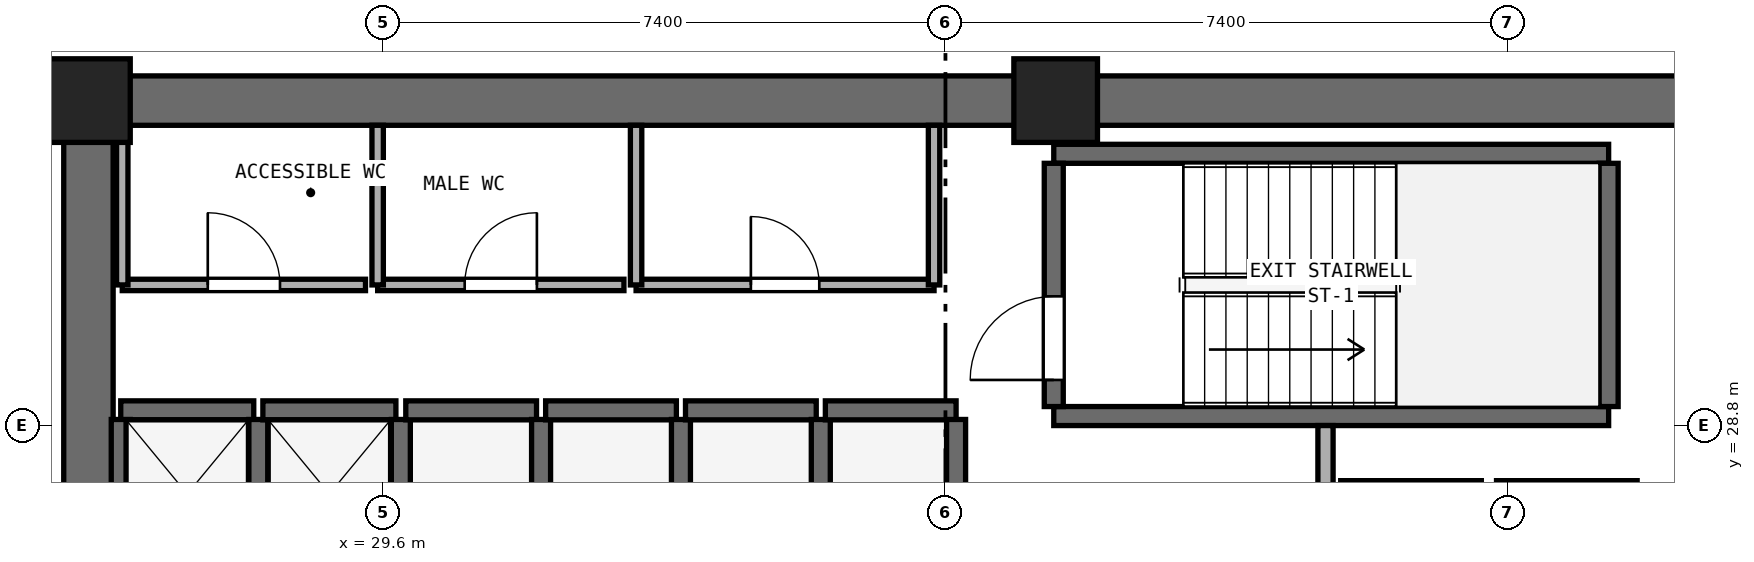
"""IFC4 building model, lengths in metres.
Left out: names, types, materials, properties, quantities, classifications, styles, units other than length and angle.
Written with IfcOpenShell. Run it as: python <this file> out.ifc"""

import sys

from ifc_helpers import new_model, si_unit, direction, frame, frame_2d, origin, origin_2d, place, context, subcontext, project, spatial, rectangle, extrude, element, fill, save


model = new_model("IFC4")
c1 = context("Model", 3, precision=1e-05, world=origin(), true_north=direction((0.0, 1.0)))
c2 = subcontext(c1, "Body", "Model", "MODEL_VIEW")
j1 = project(units=[si_unit("LENGTHUNIT", "METRE"), si_unit("PLANEANGLEUNIT", "RADIAN")], contexts=[c1])
p1 = place(None, origin())
s1 = spatial("IfcSite", under=j1, at=p1, CompositionType="ELEMENT")
p2 = place(p1, origin())
s2 = spatial("IfcBuilding", under=s1, at=p2, CompositionType="ELEMENT")
p3 = place(p2, frame((0.0, 0.0, 66.8)))
s3 = spatial("IfcBuildingStorey", under=s2, at=p3, CompositionType="ELEMENT", Elevation=66.8)
p4 = place(p3, frame((25.4, 33.075, 0.0), z_axis=(0.0, 0.0, 1.0), x_axis=(1.0, 0.0, 0.0)))
e1 = element("IfcWall", 1, at=p4, inside=s3, PredefinedType="SHEAR", context=c2, shape_type="SweptSolid", body=[
    extrude(rectangle(XDim=23.2, YDim=0.65, at=frame_2d((11.6, 0.0))), origin(), (0.0, 0.0, 1.0), 3.525),
])
p5 = place(p3, frame((25.725, 17.65, 0.0), z_axis=(0.0, 0.0, 1.0), x_axis=(0.0, 1.0, 0.0)))
e2 = element("IfcWall", 2, at=p5, inside=s3, PredefinedType="SHEAR", context=c2, shape_type="SweptSolid", body=[
    extrude(rectangle(XDim=15.1, YDim=0.65, at=frame_2d((7.55, 0.0))), origin(), (0.0, 0.0, 1.0), 3.525),
])
p6 = place(p5, frame((6.8, 0.0, 0.0)))
e3 = element("IfcOpeningElement", 3, at=p6, cuts=e2, PredefinedType="OPENING", context=c2, shape_type="SweptSolid", body=[
    extrude(rectangle(XDim=1.5, YDim=2.15, at=frame_2d((0.75, 1.075))), frame((0.0, 0.335, 0.0), z_axis=(0.0, -1.0, 0.0), x_axis=(1.0, 0.0, 0.0)), (0.0, 0.0, 1.0), 0.67),
])
for number, where, z_axis, x_axis in (
    (4, (38.45, 33.075, 0.0), (0.0, 0.0, 1.0), (1.0, 0.0, 0.0)),
    (5, (25.725, 33.075, 0.0), (0.0, 0.0, 1.0), (1.0, 0.0, 0.0)),
):
    element("IfcColumn", number, at=place(p3, frame(where, z_axis=z_axis, x_axis=x_axis)), inside=s3, PredefinedType="PILASTER", context=c2, shape_type="SweptSolid", body=[
        extrude(rectangle(XDim=1.1, YDim=1.1, at=origin_2d()), origin(), (0.0, 0.0, 1.0), 3.8),
    ])
for number, where, z_axis, x_axis in (
    (6, (38.425, 28.925, 0.0), (0.0, 0.0, 1.0), (1.0, 0.0, 0.0)),
    (7, (38.425, 32.375, 0.0), (0.0, 0.0, 1.0), (1.0, 0.0, 0.0)),
):
    element("IfcWall", number, at=place(p3, frame(where, z_axis=z_axis, x_axis=x_axis)), inside=s3, PredefinedType="SHEAR", context=c2, shape_type="SweptSolid", body=[
        extrude(rectangle(XDim=7.3, YDim=0.25, at=frame_2d((3.65, 0.0))), origin(), (0.0, 0.0, 1.0), 3.525),
    ])
p7 = place(p3, frame((38.425, 29.05, 0.0), z_axis=(0.0, 0.0, 1.0), x_axis=(0.0, 1.0, 0.0)))
e8 = element("IfcWall", 8, at=p7, inside=s3, PredefinedType="SHEAR", context=c2, shape_type="SweptSolid", body=[
    extrude(rectangle(XDim=3.2, YDim=0.25, at=frame_2d((1.6, 0.0))), origin(), (0.0, 0.0, 1.0), 3.525),
])
p8 = place(p7, frame((0.35, 0.0, 0.0)))
e9 = element("IfcOpeningElement", 9, at=p8, cuts=e8, PredefinedType="OPENING", context=c2, shape_type="SweptSolid", body=[
    extrude(rectangle(XDim=1.1, YDim=2.15, at=frame_2d((0.55, 1.075))), frame((0.0, 0.135, 0.0), z_axis=(0.0, -1.0, 0.0), x_axis=(1.0, 0.0, 0.0)), (0.0, 0.0, 1.0), 0.27),
])
p9 = place(p3, frame((45.725, 29.05, 0.0), z_axis=(0.0, 0.0, 1.0), x_axis=(0.0, 1.0, 0.0)))
e10 = element("IfcWall", 10, at=p9, inside=s3, PredefinedType="SHEAR", context=c2, shape_type="SweptSolid", body=[
    extrude(rectangle(XDim=3.2, YDim=0.25, at=frame_2d((1.6, 0.0))), origin(), (0.0, 0.0, 1.0), 3.525),
])
p10 = place(p3, frame((26.15, 29.0, 0.0), z_axis=(0.0, 0.0, 1.0), x_axis=(1.0, 0.0, 0.0)))
e11 = element("IfcWall", 11, at=p10, inside=s3, PredefinedType="SHEAR", context=c2, shape_type="SweptSolid", body=[
    extrude(rectangle(XDim=1.75, YDim=0.25, at=frame_2d((0.875, 0.0))), origin(), (0.0, 0.0, 1.0), 3.525),
])
for number, where, z_axis, x_axis in (
    (12, (26.15, 26.92, 0.0), (0.0, 0.0, 1.0), (0.0, 1.0, 0.0)),
    (13, (27.96, 26.92, 0.0), (0.0, 0.0, 1.0), (0.0, 1.0, 0.0)),
):
    element("IfcWall", number, at=place(p3, frame(where, z_axis=z_axis, x_axis=x_axis)), inside=s3, PredefinedType="SHEAR", context=c2, shape_type="SweptSolid", body=[
        extrude(rectangle(XDim=1.96, YDim=0.25, at=frame_2d((0.98, 0.0))), origin(), (0.0, 0.0, 1.0), 3.525),
    ])
p11 = place(p3, frame((28.02, 29.0, 0.0), z_axis=(0.0, 0.0, 1.0), x_axis=(1.0, 0.0, 0.0)))
e14 = element("IfcWall", 14, at=p11, inside=s3, PredefinedType="SHEAR", context=c2, shape_type="SweptSolid", body=[
    extrude(rectangle(XDim=1.75, YDim=0.25, at=frame_2d((0.875, 0.0))), origin(), (0.0, 0.0, 1.0), 3.525),
])
p12 = place(p3, frame((29.835, 26.92, 0.0), z_axis=(0.0, 0.0, 1.0), x_axis=(0.0, 1.0, 0.0)))
e15 = element("IfcWall", 15, at=p12, inside=s3, PredefinedType="SHEAR", context=c2, shape_type="SweptSolid", body=[
    extrude(rectangle(XDim=1.96, YDim=0.25, at=frame_2d((0.98, 0.0))), origin(), (0.0, 0.0, 1.0), 3.525),
])
p13 = place(p3, frame((29.9, 29.0, 0.0), z_axis=(0.0, 0.0, 1.0), x_axis=(1.0, 0.0, 0.0)))
e16 = element("IfcWall", 16, at=p13, inside=s3, PredefinedType="SHEAR", context=c2, shape_type="SweptSolid", body=[
    extrude(rectangle(XDim=1.72, YDim=0.25, at=frame_2d((0.86, 0.0))), origin(), (0.0, 0.0, 1.0), 3.525),
])
p14 = place(p3, frame((31.68, 26.92, 0.0), z_axis=(0.0, 0.0, 1.0), x_axis=(0.0, 1.0, 0.0)))
e17 = element("IfcWall", 17, at=p14, inside=s3, PredefinedType="SHEAR", context=c2, shape_type="SweptSolid", body=[
    extrude(rectangle(XDim=1.96, YDim=0.25, at=frame_2d((0.98, 0.0))), origin(), (0.0, 0.0, 1.0), 3.525),
])
p15 = place(p3, frame((31.74, 29.0, 0.0), z_axis=(0.0, 0.0, 1.0), x_axis=(1.0, 0.0, 0.0)))
e18 = element("IfcWall", 18, at=p15, inside=s3, PredefinedType="SHEAR", context=c2, shape_type="SweptSolid", body=[
    extrude(rectangle(XDim=1.72, YDim=0.25, at=frame_2d((0.86, 0.0))), origin(), (0.0, 0.0, 1.0), 3.525),
])
p16 = place(p3, frame((33.52, 26.92, 0.0), z_axis=(0.0, 0.0, 1.0), x_axis=(0.0, 1.0, 0.0)))
e19 = element("IfcWall", 19, at=p16, inside=s3, PredefinedType="SHEAR", context=c2, shape_type="SweptSolid", body=[
    extrude(rectangle(XDim=1.96, YDim=0.25, at=frame_2d((0.98, 0.0))), origin(), (0.0, 0.0, 1.0), 3.525),
])
p17 = place(p3, frame((33.58, 29.0, 0.0), z_axis=(0.0, 0.0, 1.0), x_axis=(1.0, 0.0, 0.0)))
e20 = element("IfcWall", 20, at=p17, inside=s3, PredefinedType="SHEAR", context=c2, shape_type="SweptSolid", body=[
    extrude(rectangle(XDim=1.72, YDim=0.25, at=frame_2d((0.86, 0.0))), origin(), (0.0, 0.0, 1.0), 3.525),
])
p18 = place(p3, frame((35.36, 26.92, 0.0), z_axis=(0.0, 0.0, 1.0), x_axis=(0.0, 1.0, 0.0)))
e21 = element("IfcWall", 21, at=p18, inside=s3, PredefinedType="SHEAR", context=c2, shape_type="SweptSolid", body=[
    extrude(rectangle(XDim=1.96, YDim=0.25, at=frame_2d((0.98, 0.0))), origin(), (0.0, 0.0, 1.0), 3.525),
])
p19 = place(p3, frame((35.42, 29.0, 0.0), z_axis=(0.0, 0.0, 1.0), x_axis=(1.0, 0.0, 0.0)))
e22 = element("IfcWall", 22, at=p19, inside=s3, PredefinedType="SHEAR", context=c2, shape_type="SweptSolid", body=[
    extrude(rectangle(XDim=1.72, YDim=0.25, at=frame_2d((0.86, 0.0))), origin(), (0.0, 0.0, 1.0), 3.525),
])
p20 = place(p3, frame((37.14, 26.92, 0.0), z_axis=(0.0, 0.0, 1.0), x_axis=(0.0, 1.0, 0.0)))
e23 = element("IfcWall", 23, at=p20, inside=s3, PredefinedType="SHEAR", context=c2, shape_type="SweptSolid", body=[
    extrude(rectangle(XDim=1.96, YDim=0.25, at=frame_2d((0.98, 0.0))), origin(), (0.0, 0.0, 1.0), 3.525),
])
for number, where, z_axis, x_axis in (
    (24, (42.2, 27.95, 0.0), (0.0, 0.0, 1.0), (1.0, 0.0, 0.0)),
    (25, (44.25, 27.95, 0.0), (0.0, 0.0, 1.0), (1.0, 0.0, 0.0)),
):
    element("IfcWall", number, at=place(p3, frame(where, z_axis=z_axis, x_axis=x_axis)), inside=s3, PredefinedType="SHEAR", context=c2, shape_type="SweptSolid", body=[
        extrude(rectangle(XDim=1.85, YDim=0.25, at=frame_2d((0.925, 0.0))), origin(), (0.0, 0.0, 1.0), 3.525),
    ])
p21 = place(p3, frame((42.0, 22.75, 0.0), z_axis=(0.0, 0.0, 1.0), x_axis=(0.0, 1.0, 0.0)))
e26 = element("IfcWall", 26, at=p21, inside=s3, PredefinedType="SOLIDWALL", context=c2, shape_type="SweptSolid", body=[
    extrude(rectangle(XDim=6.05, YDim=0.2, at=frame_2d((3.025, 0.0))), origin(), (0.0, 0.0, 1.0), 3.525),
])
p22 = place(p21, frame((0.65, 0.0, 0.0)))
e27 = element("IfcOpeningElement", 27, at=p22, cuts=e26, PredefinedType="OPENING", context=c2, shape_type="SweptSolid", body=[
    extrude(rectangle(XDim=1.2, YDim=2.15, at=frame_2d((0.6, 1.075))), frame((0.0, 0.11, 0.0), z_axis=(0.0, -1.0, 0.0), x_axis=(1.0, 0.0, 0.0)), (0.0, 0.0, 1.0), 0.22),
])
p23 = place(p3, frame((26.17, 30.65, 0.0), z_axis=(0.0, 0.0, 1.0), x_axis=(1.0, 0.0, 0.0)))
e28 = element("IfcWall", 28, at=p23, inside=s3, PredefinedType="PARTITIONING", context=c2, shape_type="SweptSolid", body=[
    extrude(rectangle(XDim=3.2, YDim=0.15, at=frame_2d((1.6, 0.0))), origin(), (0.0, 0.0, 1.0), 3.525),
])
p24 = place(p23, frame((1.125, 0.0, 0.0)))
e29 = element("IfcOpeningElement", 29, at=p24, cuts=e28, PredefinedType="OPENING", context=c2, shape_type="SweptSolid", body=[
    extrude(rectangle(XDim=0.95, YDim=2.1, at=frame_2d((0.475, 1.05))), frame((0.0, 0.085, 0.0), z_axis=(0.0, -1.0, 0.0), x_axis=(1.0, 0.0, 0.0)), (0.0, 0.0, 1.0), 0.17),
])
p25 = place(p3, frame((26.17, 30.65, 0.0), z_axis=(0.0, 0.0, 1.0), x_axis=(0.0, 1.0, 0.0)))
e30 = element("IfcWall", 30, at=p25, inside=s3, PredefinedType="PARTITIONING", context=c2, shape_type="SweptSolid", body=[
    extrude(rectangle(XDim=2.1, YDim=0.15, at=frame_2d((1.05, 0.0))), origin(), (0.0, 0.0, 1.0), 3.525),
])
p26 = place(p3, frame((29.53, 30.65, 0.0), z_axis=(0.0, 0.0, 1.0), x_axis=(1.0, 0.0, 0.0)))
e31 = element("IfcWall", 31, at=p26, inside=s3, PredefinedType="PARTITIONING", context=c2, shape_type="SweptSolid", body=[
    extrude(rectangle(XDim=3.24, YDim=0.15, at=frame_2d((1.62, 0.0))), origin(), (0.0, 0.0, 1.0), 3.525),
])
p27 = place(p26, frame((1.145, 0.0, 0.0)))
e32 = element("IfcOpeningElement", 32, at=p27, cuts=e31, PredefinedType="OPENING", context=c2, shape_type="SweptSolid", body=[
    extrude(rectangle(XDim=0.95, YDim=2.1, at=frame_2d((0.475, 1.05))), frame((0.0, 0.085, 0.0), z_axis=(0.0, -1.0, 0.0), x_axis=(1.0, 0.0, 0.0)), (0.0, 0.0, 1.0), 0.17),
])
p28 = place(p3, frame((29.53, 30.65, 0.0), z_axis=(0.0, 0.0, 1.0), x_axis=(0.0, 1.0, 0.0)))
e33 = element("IfcWall", 33, at=p28, inside=s3, PredefinedType="PARTITIONING", context=c2, shape_type="SweptSolid", body=[
    extrude(rectangle(XDim=2.1, YDim=0.15, at=frame_2d((1.05, 0.0))), origin(), (0.0, 0.0, 1.0), 3.525),
])
p29 = place(p3, frame((32.93, 30.65, 0.0), z_axis=(0.0, 0.0, 1.0), x_axis=(1.0, 0.0, 0.0)))
e34 = element("IfcWall", 34, at=p29, inside=s3, PredefinedType="PARTITIONING", context=c2, shape_type="SweptSolid", body=[
    extrude(rectangle(XDim=3.92, YDim=0.15, at=frame_2d((1.96, 0.0))), origin(), (0.0, 0.0, 1.0), 3.525),
])
p30 = place(p29, frame((1.51, 0.0, 0.0)))
e35 = element("IfcOpeningElement", 35, at=p30, cuts=e34, PredefinedType="OPENING", context=c2, shape_type="SweptSolid", body=[
    extrude(rectangle(XDim=0.9, YDim=2.1, at=frame_2d((0.45, 1.05))), frame((0.0, 0.085, 0.0), z_axis=(0.0, -1.0, 0.0), x_axis=(1.0, 0.0, 0.0)), (0.0, 0.0, 1.0), 0.17),
])
for number, where, z_axis, x_axis in (
    (36, (32.93, 30.65, 0.0), (0.0, 0.0, 1.0), (0.0, 1.0, 0.0)),
    (37, (36.85, 30.65, 0.0), (0.0, 0.0, 1.0), (0.0, 1.0, 0.0)),
):
    element("IfcWall", number, at=place(p3, frame(where, z_axis=z_axis, x_axis=x_axis)), inside=s3, PredefinedType="PARTITIONING", context=c2, shape_type="SweptSolid", body=[
        extrude(rectangle(XDim=2.1, YDim=0.15, at=frame_2d((1.05, 0.0))), origin(), (0.0, 0.0, 1.0), 3.525),
    ])
p31 = place(p8, origin())
e38 = element("IfcDoor", 38, at=p31, inside=s3, OperationType="SINGLE_SWING_LEFT", PredefinedType="DOOR", context=c2, shape_type="SweptSolid", body=[
    extrude(rectangle(XDim=1.1, YDim=2.15, at=frame_2d((0.55, 1.075))), frame((0.0, 0.025, 0.0), z_axis=(0.0, -1.0, 0.0), x_axis=(1.0, 0.0, 0.0)), (0.0, 0.0, 1.0), 0.05),
])
fill(e9, e38)
p32 = place(p24, origin())
e39 = element("IfcDoor", 39, at=p32, inside=s3, OperationType="SINGLE_SWING_LEFT", PredefinedType="DOOR", context=c2, shape_type="SweptSolid", body=[
    extrude(rectangle(XDim=0.95, YDim=2.1, at=frame_2d((0.475, 1.05))), frame((0.0, 0.025, 0.0), z_axis=(0.0, -1.0, 0.0), x_axis=(1.0, 0.0, 0.0)), (0.0, 0.0, 1.0), 0.05),
])
fill(e29, e39)
p33 = place(p27, origin())
e40 = element("IfcDoor", 40, at=p33, inside=s3, OperationType="SINGLE_SWING_RIGHT", PredefinedType="DOOR", context=c2, shape_type="SweptSolid", body=[
    extrude(rectangle(XDim=0.95, YDim=2.1, at=frame_2d((0.475, 1.05))), frame((0.0, 0.025, 0.0), z_axis=(0.0, -1.0, 0.0), x_axis=(1.0, 0.0, 0.0)), (0.0, 0.0, 1.0), 0.05),
])
fill(e32, e40)
p34 = place(p30, origin())
e41 = element("IfcDoor", 41, at=p34, inside=s3, OperationType="SINGLE_SWING_LEFT", PredefinedType="DOOR", context=c2, shape_type="SweptSolid", body=[
    extrude(rectangle(XDim=0.9, YDim=2.1, at=frame_2d((0.45, 1.05))), frame((0.0, 0.025, 0.0), z_axis=(0.0, -1.0, 0.0), x_axis=(1.0, 0.0, 0.0)), (0.0, 0.0, 1.0), 0.05),
])
fill(e35, e41)
save(model, sys.argv[1])
